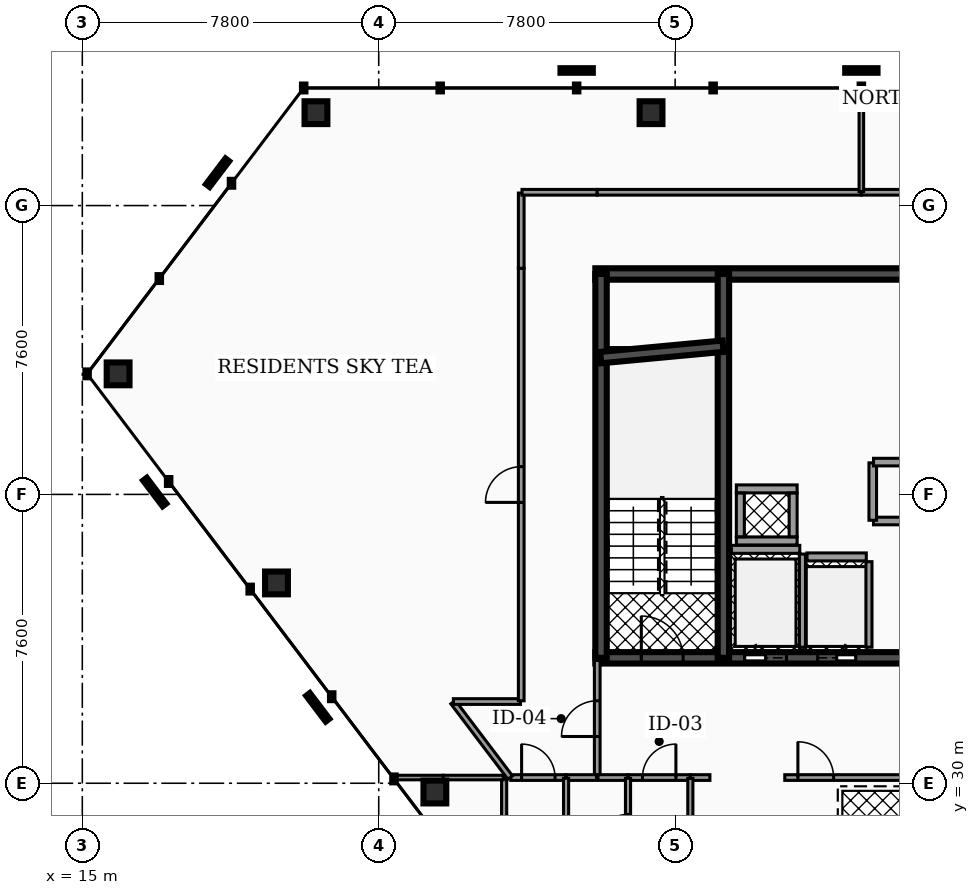
"""IFC4 building model, lengths in metres.
Left out: names, types, materials, properties, quantities, classifications, styles, units other than length and angle.
Written with IfcOpenShell. Run it as: python <this file> out.ifc"""

import sys

from ifc_helpers import new_model, si_unit, direction, frame, frame_2d, origin, origin_2d, place, context, subcontext, project, spatial, rectangle, hollow_rectangle, extrude, element, fill, save


model = new_model("IFC4")
c1 = context("Model", 3, precision=1e-05, world=origin(), true_north=direction((0.0, 1.0)))
c2 = subcontext(c1, "Body", "Model", "MODEL_VIEW")
j1 = project(units=[si_unit("LENGTHUNIT", "METRE"), si_unit("PLANEANGLEUNIT", "RADIAN")], contexts=[c1])
p1 = place(None, origin())
s1 = spatial("IfcSite", under=j1, at=p1, CompositionType="ELEMENT")
p2 = place(p1, origin())
s2 = spatial("IfcBuilding", under=s1, at=p2, CompositionType="ELEMENT")
p3 = place(p2, frame((0.0, 0.0, 222.36)))
s3 = spatial("IfcBuildingStorey", under=s2, at=p3, CompositionType="ELEMENT", Elevation=222.36)
p4 = place(p3, frame((28.5, 43.4, 0.0), z_axis=(0.0, 0.0, 1.0), x_axis=(1.0, 0.0, 0.0)))
e1 = element("IfcWall", 1, at=p4, inside=s3, PredefinedType="SHEAR", context=c2, shape_type="SweptSolid", body=[
    extrude(rectangle(XDim=19.86, YDim=0.3, at=frame_2d((9.93, 0.0))), origin(), (0.0, 0.0, 1.0), 3.18),
])
p5 = place(p3, frame((28.5, 33.3, 0.0), z_axis=(0.0, 0.0, 1.0), x_axis=(1.0, 0.0, 0.0)))
e2 = element("IfcWall", 2, at=p5, inside=s3, PredefinedType="SHEAR", context=c2, shape_type="SweptSolid", body=[
    extrude(rectangle(XDim=19.86, YDim=0.3, at=frame_2d((9.93, 0.0))), origin(), (0.0, 0.0, 1.0), 3.18),
])
p6 = place(p5, frame((3.93, 0.0, 0.0)))
e3 = element("IfcOpeningElement", 3, at=p6, cuts=e2, PredefinedType="OPENING", context=c2, shape_type="SweptSolid", body=[
    extrude(rectangle(XDim=1.1, YDim=2.15, at=frame_2d((0.55, 1.075))), frame((0.0, 0.16, 0.0), z_axis=(0.0, -1.0, 0.0), x_axis=(1.0, 0.0, 0.0)), (0.0, 0.0, 1.0), 0.32),
])
p7 = place(p5, frame((14.77, 0.0, 0.0)))
e4 = element("IfcOpeningElement", 4, at=p7, cuts=e2, PredefinedType="OPENING", context=c2, shape_type="SweptSolid", body=[
    extrude(rectangle(XDim=1.1, YDim=2.15, at=frame_2d((0.55, 1.075))), frame((0.0, 0.16, 0.0), z_axis=(0.0, -1.0, 0.0), x_axis=(1.0, 0.0, 0.0)), (0.0, 0.0, 1.0), 0.32),
])
p8 = place(p5, frame((11.25, 0.0, 0.0)))
e5 = element("IfcOpeningElement", 5, at=p8, cuts=e2, PredefinedType="OPENING", context=c2, shape_type="SweptSolid", body=[
    extrude(rectangle(XDim=1.0, YDim=2.1, at=frame_2d((0.5, 1.05))), frame((0.0, 0.16, 0.0), z_axis=(0.0, -1.0, 0.0), x_axis=(1.0, 0.0, 0.0)), (0.0, 0.0, 1.0), 0.32),
])
p9 = place(p5, frame((12.95, 0.0, 0.0)))
e6 = element("IfcOpeningElement", 6, at=p9, cuts=e2, PredefinedType="OPENING", context=c2, shape_type="SweptSolid", body=[
    extrude(rectangle(XDim=1.0, YDim=2.1, at=frame_2d((0.5, 1.05))), frame((0.0, 0.16, 0.0), z_axis=(0.0, -1.0, 0.0), x_axis=(1.0, 0.0, 0.0)), (0.0, 0.0, 1.0), 0.32),
])
p10 = place(p5, frame((5.85, 0.0, 0.0)))
e7 = element("IfcOpeningElement", 7, at=p10, cuts=e2, PredefinedType="OPENING", context=c2, shape_type="SweptSolid", body=[
    extrude(rectangle(XDim=1.0, YDim=2.1, at=frame_2d((0.5, 1.05))), frame((0.0, 0.16, 0.0), z_axis=(0.0, -1.0, 0.0), x_axis=(1.0, 0.0, 0.0)), (0.0, 0.0, 1.0), 0.32),
])
p11 = place(p5, frame((1.21, 0.0, 0.0)))
e8 = element("IfcOpeningElement", 8, at=p11, cuts=e2, PredefinedType="OPENING", context=c2, shape_type="SweptSolid", body=[
    extrude(rectangle(XDim=1.1, YDim=2.2, at=frame_2d((0.55, 1.1))), frame((0.0, 0.16, 0.0), z_axis=(0.0, -1.0, 0.0), x_axis=(1.0, 0.0, 0.0)), (0.0, 0.0, 1.0), 0.32),
])
p12 = place(p5, frame((9.34, 0.0, 0.0)))
e9 = element("IfcOpeningElement", 9, at=p12, cuts=e2, PredefinedType="OPENING", context=c2, shape_type="SweptSolid", body=[
    extrude(rectangle(XDim=1.12, YDim=2.05, at=frame_2d((0.56, 1.025))), frame((0.0, 0.16, 0.0), z_axis=(0.0, -1.0, 0.0), x_axis=(1.0, 0.0, 0.0)), (0.0, 0.0, 1.0), 0.32),
])
p13 = place(p5, frame((17.55, 0.0, 0.0)))
e10 = element("IfcOpeningElement", 10, at=p13, cuts=e2, PredefinedType="OPENING", context=c2, shape_type="SweptSolid", body=[
    extrude(rectangle(XDim=1.1, YDim=2.2, at=frame_2d((0.55, 1.1))), frame((0.0, 0.16, 0.0), z_axis=(0.0, -1.0, 0.0), x_axis=(1.0, 0.0, 0.0)), (0.0, 0.0, 1.0), 0.32),
])
for number, where, z_axis, x_axis in (
    (11, (28.65, 33.3, 0.0), (0.0, 0.0, 1.0), (0.0, 1.0, 0.0)),
    (12, (31.87, 33.3, 0.0), (0.0, 0.0, 1.0), (0.0, 1.0, 0.0)),
):
    element("IfcWall", number, at=place(p3, frame(where, z_axis=z_axis, x_axis=x_axis)), inside=s3, PredefinedType="SHEAR", context=c2, shape_type="SweptSolid", body=[
        extrude(rectangle(XDim=10.1, YDim=0.3, at=frame_2d((5.05, 0.0))), origin(), (0.0, 0.0, 1.0), 3.18),
    ])
p14 = place(p3, frame((28.64, 41.2, 0.0), z_axis=(0.0, 0.0, 1.0), x_axis=(0.995687118776, 0.092774789157, 0.0)))
e13 = element("IfcWall", 13, at=p14, inside=s3, PredefinedType="SHEAR", context=c2, shape_type="SweptSolid", body=[
    extrude(rectangle(XDim=3.234, YDim=0.3, at=frame_2d((1.617, 0.0))), origin(), (0.0, 0.0, 1.0), 3.18),
])
for number, where, z_axis, x_axis in (
    (14, (29.966, 47.644, 0.0), (0.0, 0.0, 1.0), (1.0, 0.0, 0.0)),
    (15, (21.148, 47.644, 0.0), (0.0, 0.0, 1.0), (1.0, 0.0, 0.0)),
    (16, (15.942, 40.772, 0.0), (0.0, 0.0, 1.0), (1.0, 0.0, 0.0)),
    (17, (20.11, 35.271, 0.0), (0.0, 0.0, 1.0), (1.0, 0.0, 0.0)),
    (18, (24.278, 29.769, 0.0), (0.0, 0.0, 1.0), (1.0, 0.0, 0.0)),
):
    element("IfcColumn", number, at=place(p3, frame(where, z_axis=z_axis, x_axis=x_axis)), inside=s3, PredefinedType="COLUMN", context=c2, shape_type="SweptSolid", body=[
        extrude(hollow_rectangle(XDim=0.6, YDim=0.6, WallThickness=0.03, at=origin_2d()), origin(), (0.0, 0.0, 1.0), 3.18),
    ])
p15 = place(p3, frame((32.08, 36.155, 0.0), z_axis=(0.0, 0.0, 1.0), x_axis=(1.0, 0.0, 0.0)))
e19 = element("IfcWall", 19, at=p15, inside=s3, PredefinedType="SOLIDWALL", context=c2, shape_type="SweptSolid", body=[
    extrude(rectangle(XDim=1.8, YDim=0.21, at=frame_2d((0.9, 0.0))), origin(), (0.0, 0.0, 1.0), 3.18),
])
p16 = place(p3, frame((33.95, 33.58, 0.0), z_axis=(0.0, 0.0, 1.0), x_axis=(0.0, 1.0, 0.0)))
e20 = element("IfcWall", 20, at=p16, inside=s3, PredefinedType="SOLIDWALL", context=c2, shape_type="SweptSolid", body=[
    extrude(rectangle(XDim=2.45, YDim=0.16, at=frame_2d((1.225, 0.0))), origin(), (0.0, 0.0, 1.0), 3.18),
])
p17 = place(p3, frame((34.07, 35.955, 0.0), z_axis=(0.0, 0.0, 1.0), x_axis=(1.0, 0.0, 0.0)))
e21 = element("IfcWall", 21, at=p17, inside=s3, PredefinedType="SOLIDWALL", context=c2, shape_type="SweptSolid", body=[
    extrude(rectangle(XDim=1.56, YDim=0.21, at=frame_2d((0.78, 0.0))), origin(), (0.0, 0.0, 1.0), 3.18),
])
p18 = place(p3, frame((35.7, 33.58, 0.0), z_axis=(0.0, 0.0, 1.0), x_axis=(0.0, 1.0, 0.0)))
e22 = element("IfcWall", 22, at=p18, inside=s3, PredefinedType="SOLIDWALL", context=c2, shape_type="SweptSolid", body=[
    extrude(rectangle(XDim=2.25, YDim=0.16, at=frame_2d((1.125, 0.0))), origin(), (0.0, 0.0, 1.0), 3.18),
])
for number, where, z_axis, x_axis in (
    (23, (32.21, 36.375, 0.0), (0.0, 0.0, 1.0), (1.0, 0.0, 0.0)),
    (24, (32.21, 37.745, 0.0), (0.0, 0.0, 1.0), (1.0, 0.0, 0.0)),
):
    element("IfcWall", number, at=place(p3, frame(where, z_axis=z_axis, x_axis=x_axis)), inside=s3, PredefinedType="SOLIDWALL", context=c2, shape_type="SweptSolid", body=[
        extrude(rectangle(XDim=1.6, YDim=0.21, at=frame_2d((0.8, 0.0))), origin(), (0.0, 0.0, 1.0), 3.18),
    ])
for number, where, z_axis, x_axis in (
    (25, (32.315, 36.485, 0.0), (0.0, 0.0, 1.0), (0.0, 1.0, 0.0)),
    (26, (33.705, 36.485, 0.0), (0.0, 0.0, 1.0), (0.0, 1.0, 0.0)),
):
    element("IfcWall", number, at=place(p3, frame(where, z_axis=z_axis, x_axis=x_axis)), inside=s3, PredefinedType="SOLIDWALL", context=c2, shape_type="SweptSolid", body=[
        extrude(rectangle(XDim=1.15, YDim=0.21, at=frame_2d((0.575, 0.0))), origin(), (0.0, 0.0, 1.0), 3.18),
    ])
p19 = place(p3, frame((35.82, 36.9, 0.0), z_axis=(0.0, 0.0, 1.0), x_axis=(1.0, 0.0, 0.0)))
e27 = element("IfcWall", 27, at=p19, inside=s3, PredefinedType="PARTITIONING", context=c2, shape_type="SweptSolid", body=[
    extrude(rectangle(XDim=1.71, YDim=0.2, at=frame_2d((0.855, 0.0))), origin(), (0.0, 0.0, 1.0), 2.235),
])
p20 = place(p3, frame((35.8, 36.92, 0.0), z_axis=(0.0, 0.0, 1.0), x_axis=(0.0, 1.0, 0.0)))
e28 = element("IfcWall", 28, at=p20, inside=s3, PredefinedType="PARTITIONING", context=c2, shape_type="SweptSolid", body=[
    extrude(rectangle(XDim=1.51, YDim=0.2, at=frame_2d((0.755, 0.0))), origin(), (0.0, 0.0, 1.0), 2.235),
])
p21 = place(p3, frame((35.82, 38.45, 0.0), z_axis=(0.0, 0.0, 1.0), x_axis=(1.0, 0.0, 0.0)))
e29 = element("IfcWall", 29, at=p21, inside=s3, PredefinedType="PARTITIONING", context=c2, shape_type="SweptSolid", body=[
    extrude(rectangle(XDim=1.71, YDim=0.2, at=frame_2d((0.855, 0.0))), origin(), (0.0, 0.0, 1.0), 2.235),
])
p22 = place(p3, frame((28.55, 30.17, 0.0), z_axis=(0.0, 0.0, 1.0), x_axis=(0.0, 1.0, 0.0)))
e30 = element("IfcWall", 30, at=p22, inside=s3, PredefinedType="PARTITIONING", context=c2, shape_type="SweptSolid", body=[
    extrude(rectangle(XDim=3.06, YDim=0.15, at=frame_2d((1.53, 0.0))), origin(), (0.0, 0.0, 1.0), 2.235),
])
p23 = place(p22, frame((1.06, 0.0, 0.0)))
e31 = element("IfcOpeningElement", 31, at=p23, cuts=e30, PredefinedType="OPENING", context=c2, shape_type="SweptSolid", body=[
    extrude(rectangle(XDim=0.94, YDim=2.05, at=frame_2d((0.47, 1.025))), frame((0.0, 0.085, 0.0), z_axis=(0.0, -1.0, 0.0), x_axis=(1.0, 0.0, 0.0)), (0.0, 0.0, 1.0), 0.17),
])
p24 = place(p3, frame((29.365, 30.15, 0.0), z_axis=(0.0, 0.0, 1.0), x_axis=(1.0, 0.0, 0.0)))
e32 = element("IfcWall", 32, at=p24, inside=s3, PredefinedType="PARTITIONING", context=c2, shape_type="SweptSolid", body=[
    extrude(rectangle(XDim=1.63, YDim=0.15, at=frame_2d((0.815, 0.0))), origin(), (0.0, 0.0, 1.0), 2.235),
])
p25 = place(p24, frame((0.375, 0.0, 0.0)))
e33 = element("IfcOpeningElement", 33, at=p25, cuts=e32, PredefinedType="OPENING", context=c2, shape_type="SweptSolid", body=[
    extrude(rectangle(XDim=0.88, YDim=2.05, at=frame_2d((0.44, 1.025))), frame((0.0, 0.085, 0.0), z_axis=(0.0, -1.0, 0.0), x_axis=(1.0, 0.0, 0.0)), (0.0, 0.0, 1.0), 0.17),
])
p26 = place(p3, frame((28.57, 30.15, 0.0), z_axis=(0.0, 0.0, 1.0), x_axis=(1.0, 0.0, 0.0)))
e34 = element("IfcWall", 34, at=p26, inside=s3, PredefinedType="PARTITIONING", context=c2, shape_type="SweptSolid", body=[
    extrude(rectangle(XDim=0.785, YDim=0.15, at=frame_2d((0.393, 0.0))), origin(), (0.0, 0.0, 1.0), 2.235),
])
p27 = place(p3, frame((33.485, 30.15, 0.0), z_axis=(0.0, 0.0, 1.0), x_axis=(1.0, 0.0, 0.0)))
e35 = element("IfcWall", 35, at=p27, inside=s3, PredefinedType="PARTITIONING", context=c2, shape_type="SweptSolid", body=[
    extrude(rectangle(XDim=8.03, YDim=0.15, at=frame_2d((4.015, 0.0))), origin(), (0.0, 0.0, 1.0), 2.235),
])
p28 = place(p27, frame((0.345, 0.0, 0.0)))
e36 = element("IfcOpeningElement", 36, at=p28, cuts=e35, PredefinedType="OPENING", context=c2, shape_type="SweptSolid", body=[
    extrude(rectangle(XDim=0.94, YDim=2.05, at=frame_2d((0.47, 1.025))), frame((0.0, 0.085, 0.0), z_axis=(0.0, -1.0, 0.0), x_axis=(1.0, 0.0, 0.0)), (0.0, 0.0, 1.0), 0.17),
])
p29 = place(p3, frame((31.005, 30.15, 0.0), z_axis=(0.0, 0.0, 1.0), x_axis=(1.0, 0.0, 0.0)))
e37 = element("IfcWall", 37, at=p29, inside=s3, PredefinedType="PARTITIONING", context=c2, shape_type="SweptSolid", body=[
    extrude(rectangle(XDim=0.51, YDim=0.15, at=frame_2d((0.255, 0.0))), origin(), (0.0, 0.0, 1.0), 2.235),
])
p30 = place(p3, frame((26.275, 30.15, 0.0), z_axis=(0.0, 0.0, 1.0), x_axis=(1.0, 0.0, 0.0)))
e38 = element("IfcWall", 38, at=p30, inside=s3, PredefinedType="PARTITIONING", context=c2, shape_type="SweptSolid", body=[
    extrude(rectangle(XDim=1.45, YDim=0.15, at=frame_2d((0.725, 0.0))), origin(), (0.0, 0.0, 1.0), 2.235),
])
p31 = place(p30, frame((0.285, 0.0, 0.0)))
e39 = element("IfcOpeningElement", 39, at=p31, cuts=e38, PredefinedType="OPENING", context=c2, shape_type="SweptSolid", body=[
    extrude(rectangle(XDim=0.88, YDim=2.05, at=frame_2d((0.44, 1.025))), frame((0.0, 0.085, 0.0), z_axis=(0.0, -1.0, 0.0), x_axis=(1.0, 0.0, 0.0)), (0.0, 0.0, 1.0), 0.17),
])
p32 = place(p3, frame((27.735, 30.15, 0.0), z_axis=(0.0, 0.0, 1.0), x_axis=(1.0, 0.0, 0.0)))
e40 = element("IfcWall", 40, at=p32, inside=s3, PredefinedType="PARTITIONING", context=c2, shape_type="SweptSolid", body=[
    extrude(rectangle(XDim=0.795, YDim=0.15, at=frame_2d((0.397, 0.0))), origin(), (0.0, 0.0, 1.0), 2.235),
])
p33 = place(p3, frame((24.757, 32.134, 0.0), z_axis=(0.0, 0.0, 1.0), x_axis=(0.603806698968, -0.797130773638, 0.0)))
e41 = element("IfcWall", 41, at=p33, inside=s3, PredefinedType="PARTITIONING", context=c2, shape_type="SweptSolid", body=[
    extrude(rectangle(XDim=2.489, YDim=0.15, at=frame_2d((1.245, 0.0))), origin(), (0.0, 0.0, 1.0), 2.235),
])
p34 = place(p3, frame((24.765, 32.15, 0.0), z_axis=(0.0, 0.0, 1.0), x_axis=(1.0, 0.0, 0.0)))
e42 = element("IfcWall", 42, at=p34, inside=s3, PredefinedType="PARTITIONING", context=c2, shape_type="SweptSolid", body=[
    extrude(rectangle(XDim=1.765, YDim=0.15, at=frame_2d((0.883, 0.0))), origin(), (0.0, 0.0, 1.0), 2.235),
])
p35 = place(p3, frame((26.55, 32.17, 0.0), z_axis=(0.0, 0.0, 1.0), x_axis=(0.0, 1.0, 0.0)))
e43 = element("IfcWall", 43, at=p35, inside=s3, PredefinedType="PARTITIONING", context=c2, shape_type="SweptSolid", body=[
    extrude(rectangle(XDim=11.38, YDim=0.15, at=frame_2d((5.69, 0.0))), origin(), (0.0, 0.0, 1.0), 2.235),
])
p36 = place(p35, frame((5.22, 0.0, 0.0)))
e44 = element("IfcOpeningElement", 44, at=p36, cuts=e43, PredefinedType="OPENING", context=c2, shape_type="SweptSolid", body=[
    extrude(rectangle(XDim=0.94, YDim=2.05, at=frame_2d((0.47, 1.025))), frame((0.0, 0.085, 0.0), z_axis=(0.0, -1.0, 0.0), x_axis=(1.0, 0.0, 0.0)), (0.0, 0.0, 1.0), 0.17),
])
for number, where, z_axis, x_axis in (
    (45, (26.55, 43.55, 0.0), (0.0, 0.0, 1.0), (0.0, 1.0, 0.0)),
    (46, (26.57, 45.55, 0.0), (0.0, 0.0, 1.0), (1.0, 0.0, 0.0)),
):
    element("IfcWall", number, at=place(p3, frame(where, z_axis=z_axis, x_axis=x_axis)), inside=s3, PredefinedType="PARTITIONING", context=c2, shape_type="SweptSolid", body=[
        extrude(rectangle(XDim=1.98, YDim=0.15, at=frame_2d((0.99, 0.0))), origin(), (0.0, 0.0, 1.0), 2.235),
    ])
p37 = place(p3, frame((28.55, 45.55, 0.0), z_axis=(0.0, 0.0, 1.0), x_axis=(1.0, 0.0, 0.0)))
e47 = element("IfcWall", 47, at=p37, inside=s3, PredefinedType="PARTITIONING", context=c2, shape_type="SweptSolid", body=[
    extrude(rectangle(XDim=6.945, YDim=0.15, at=frame_2d((3.473, 0.0))), origin(), (0.0, 0.0, 1.0), 2.235),
])
p38 = place(p3, frame((35.505, 45.55, 0.0), z_axis=(0.0, 0.0, 1.0), x_axis=(1.0, 0.0, 0.0)))
e48 = element("IfcWall", 48, at=p38, inside=s3, PredefinedType="PARTITIONING", context=c2, shape_type="SweptSolid", body=[
    extrude(rectangle(XDim=6.345, YDim=0.15, at=frame_2d((3.173, 0.0))), origin(), (0.0, 0.0, 1.0), 2.235),
])
p39 = place(p3, frame((29.36, 27.37, 0.0), z_axis=(0.0, 0.0, 1.0), x_axis=(0.0, 1.0, 0.0)))
e49 = element("IfcWall", 49, at=p39, inside=s3, PredefinedType="PARTITIONING", context=c2, shape_type="SweptSolid", body=[
    extrude(rectangle(XDim=2.76, YDim=0.135, at=frame_2d((1.38, 0.0))), origin(), (0.0, 0.0, 1.0), 2.235),
])
p40 = place(p39, frame((0.95, 0.0, 0.0)))
e50 = element("IfcOpeningElement", 50, at=p40, cuts=e49, PredefinedType="OPENING", context=c2, shape_type="SweptSolid", body=[
    extrude(rectangle(XDim=0.86, YDim=2.05, at=frame_2d((0.43, 1.025))), frame((0.0, 0.077, 0.0), z_axis=(0.0, -1.0, 0.0), x_axis=(1.0, 0.0, 0.0)), (0.0, 0.0, 1.0), 0.155),
])
for number, where, z_axis, x_axis in (
    (51, (31.0, 27.37, 0.0), (0.0, 0.0, 1.0), (0.0, 1.0, 0.0)),
    (52, (27.73, 27.37, 0.0), (0.0, 0.0, 1.0), (0.0, 1.0, 0.0)),
    (53, (26.1, 27.37, 0.0), (0.0, 0.0, 1.0), (0.0, 1.0, 0.0)),
):
    element("IfcWall", number, at=place(p3, frame(where, z_axis=z_axis, x_axis=x_axis)), inside=s3, PredefinedType="PARTITIONING", context=c2, shape_type="SweptSolid", body=[
        extrude(rectangle(XDim=2.76, YDim=0.135, at=frame_2d((1.38, 0.0))), origin(), (0.0, 0.0, 1.0), 2.235),
    ])
p41 = place(p3, frame((23.189, 30.15, 0.0), z_axis=(0.0, 0.0, 1.0), x_axis=(1.0, 0.0, 0.0)))
e54 = element("IfcWall", 54, at=p41, inside=s3, PredefinedType="PARTITIONING", context=c2, shape_type="SweptSolid", body=[
    extrude(rectangle(XDim=1.311, YDim=0.12, at=frame_2d((0.656, 0.0))), origin(), (0.0, 0.0, 1.0), 2.235),
])
p42 = place(p3, frame((24.5, 30.15, 0.0), z_axis=(0.0, 0.0, 1.0), x_axis=(1.0, 0.0, 0.0)))
e55 = element("IfcWall", 55, at=p42, inside=s3, PredefinedType="PARTITIONING", context=c2, shape_type="SweptSolid", body=[
    extrude(rectangle(XDim=1.58, YDim=0.12, at=frame_2d((0.79, 0.0))), origin(), (0.0, 0.0, 1.0), 2.235),
])
p43 = place(p3, frame((35.5, 45.57, 0.0), z_axis=(0.0, 0.0, 1.0), x_axis=(0.0, 1.0, 0.0)))
e56 = element("IfcWall", 56, at=p43, inside=s3, PredefinedType="PARTITIONING", context=c2, shape_type="SweptSolid", body=[
    extrude(rectangle(XDim=2.709, YDim=0.12, at=frame_2d((1.354, 0.0))), origin(), (0.0, 0.0, 1.0), 2.235),
])
p44 = place(p6, origin())
e57 = element("IfcDoor", 57, at=p44, inside=s3, OperationType="SLIDING_TO_LEFT", PredefinedType="DOOR", context=c2, shape_type="SweptSolid", body=[
    extrude(rectangle(XDim=1.1, YDim=2.15, at=frame_2d((0.55, 1.075))), frame((0.0, 0.025, 0.0), z_axis=(0.0, -1.0, 0.0), x_axis=(1.0, 0.0, 0.0)), (0.0, 0.0, 1.0), 0.05),
])
fill(e3, e57)
p45 = place(p10, origin())
e58 = element("IfcDoor", 58, at=p45, inside=s3, OperationType="SLIDING_TO_RIGHT", PredefinedType="DOOR", context=c2, shape_type="SweptSolid", body=[
    extrude(rectangle(XDim=1.0, YDim=2.1, at=frame_2d((0.5, 1.05))), frame((0.0, 0.025, 0.0), z_axis=(0.0, -1.0, 0.0), x_axis=(1.0, 0.0, 0.0)), (0.0, 0.0, 1.0), 0.05),
])
fill(e7, e58)
p46 = place(p11, origin())
e59 = element("IfcDoor", 59, at=p46, inside=s3, OperationType="SINGLE_SWING_LEFT", PredefinedType="DOOR", context=c2, shape_type="SweptSolid", body=[
    extrude(rectangle(XDim=1.1, YDim=2.2, at=frame_2d((0.55, 1.1))), frame((0.0, 0.025, 0.0), z_axis=(0.0, -1.0, 0.0), x_axis=(1.0, 0.0, 0.0)), (0.0, 0.0, 1.0), 0.05),
])
fill(e8, e59)
p47 = place(p23, origin())
e60 = element("IfcDoor", 60, at=p47, inside=s3, OperationType="SINGLE_SWING_LEFT", PredefinedType="DOOR", context=c2, shape_type="SweptSolid", body=[
    extrude(rectangle(XDim=0.94, YDim=2.05, at=frame_2d((0.47, 1.025))), frame((0.0, 0.025, 0.0), z_axis=(0.0, -1.0, 0.0), x_axis=(1.0, 0.0, 0.0)), (0.0, 0.0, 1.0), 0.05),
])
fill(e31, e60)
p48 = place(p25, origin())
e61 = element("IfcDoor", 61, at=p48, inside=s3, OperationType="SINGLE_SWING_RIGHT", PredefinedType="DOOR", context=c2, shape_type="SweptSolid", body=[
    extrude(rectangle(XDim=0.88, YDim=2.05, at=frame_2d((0.44, 1.025))), frame((0.0, 0.025, 0.0), z_axis=(0.0, -1.0, 0.0), x_axis=(1.0, 0.0, 0.0)), (0.0, 0.0, 1.0), 0.05),
])
fill(e33, e61)
p49 = place(p28, origin())
e62 = element("IfcDoor", 62, at=p49, inside=s3, OperationType="SINGLE_SWING_LEFT", PredefinedType="DOOR", context=c2, shape_type="SweptSolid", body=[
    extrude(rectangle(XDim=0.94, YDim=2.05, at=frame_2d((0.47, 1.025))), frame((0.0, 0.025, 0.0), z_axis=(0.0, -1.0, 0.0), x_axis=(1.0, 0.0, 0.0)), (0.0, 0.0, 1.0), 0.05),
])
fill(e36, e62)
p50 = place(p31, origin())
e63 = element("IfcDoor", 63, at=p50, inside=s3, OperationType="SINGLE_SWING_LEFT", PredefinedType="DOOR", context=c2, shape_type="SweptSolid", body=[
    extrude(rectangle(XDim=0.88, YDim=2.05, at=frame_2d((0.44, 1.025))), frame((0.0, 0.025, 0.0), z_axis=(0.0, -1.0, 0.0), x_axis=(1.0, 0.0, 0.0)), (0.0, 0.0, 1.0), 0.05),
])
fill(e39, e63)
p51 = place(p36, origin())
e64 = element("IfcDoor", 64, at=p51, inside=s3, OperationType="SINGLE_SWING_LEFT", PredefinedType="DOOR", context=c2, shape_type="SweptSolid", body=[
    extrude(rectangle(XDim=0.94, YDim=2.05, at=frame_2d((0.47, 1.025))), frame((0.0, 0.025, 0.0), z_axis=(0.0, -1.0, 0.0), x_axis=(1.0, 0.0, 0.0)), (0.0, 0.0, 1.0), 0.05),
])
fill(e44, e64)
p52 = place(p40, origin())
e65 = element("IfcDoor", 65, at=p52, inside=s3, OperationType="SINGLE_SWING_LEFT", PredefinedType="DOOR", context=c2, shape_type="SweptSolid", body=[
    extrude(rectangle(XDim=0.86, YDim=2.05, at=frame_2d((0.43, 1.025))), frame((0.0, 0.025, 0.0), z_axis=(0.0, -1.0, 0.0), x_axis=(1.0, 0.0, 0.0)), (0.0, 0.0, 1.0), 0.05),
])
fill(e50, e65)
save(model, sys.argv[1])
